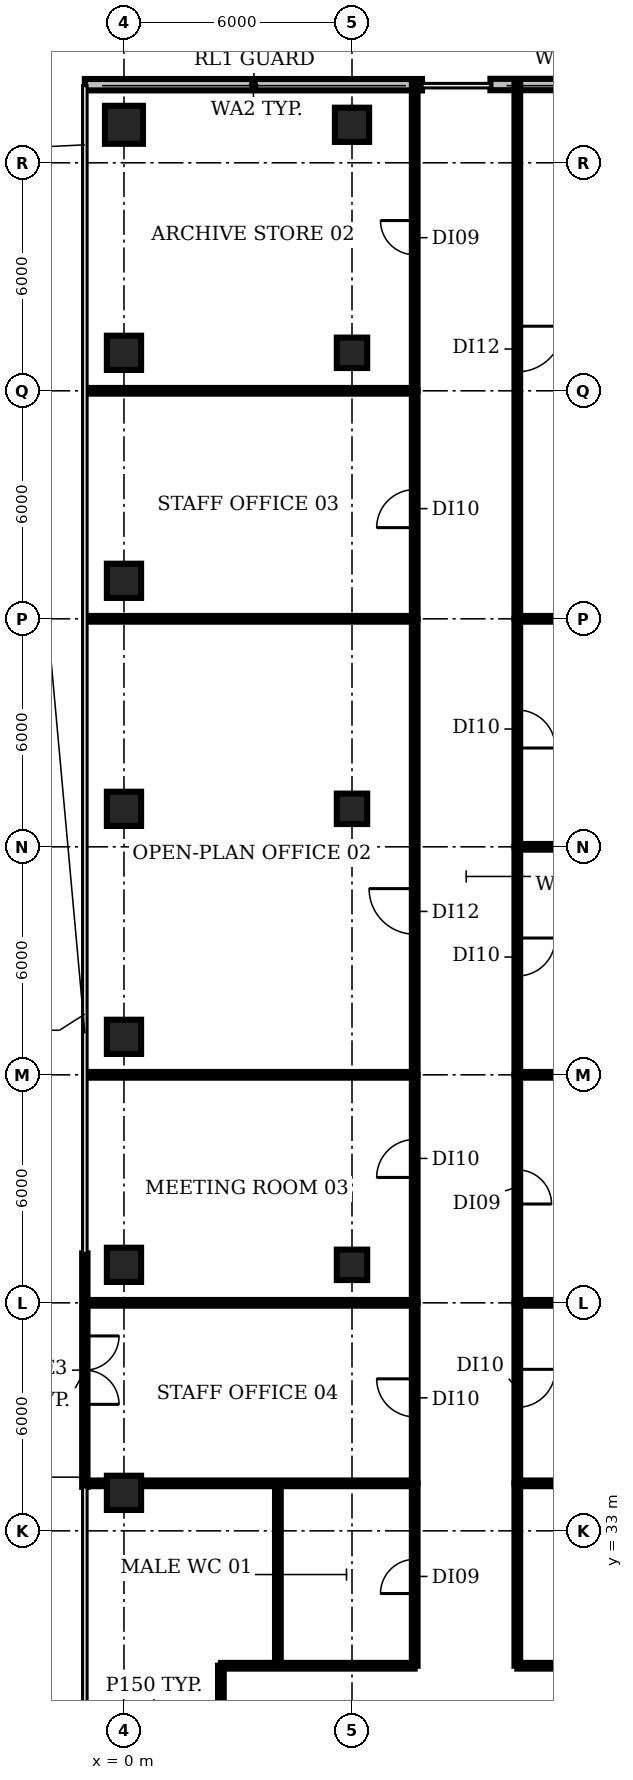
"""IFC4 building model, lengths in metres.
Left out: names, types, materials, properties, quantities, classifications, styles, units other than length and angle.
Written with IfcOpenShell. Run it as: python <this file> out.ifc"""

import sys

from ifc_helpers import new_model, si_unit, direction, frame, frame_2d, origin, origin_2d, place, context, subcontext, project, spatial, rectangle, circle, extrude, element, fill, save


model = new_model("IFC4")
c1 = context("Model", 3, precision=1e-05, world=origin(), true_north=direction((0.0, 1.0)))
c2 = subcontext(c1, "Body", "Model", "MODEL_VIEW")
j1 = project(units=[si_unit("LENGTHUNIT", "METRE"), si_unit("PLANEANGLEUNIT", "RADIAN")], contexts=[c1])
p1 = place(None, origin())
s1 = spatial("IfcSite", under=j1, at=p1, CompositionType="ELEMENT")
p2 = place(p1, origin())
s2 = spatial("IfcBuilding", under=s1, at=p2, CompositionType="ELEMENT")
p3 = place(p2, frame((0.0, 0.0, 96.2)))
s3 = spatial("IfcBuildingStorey", under=s2, at=p3, CompositionType="ELEMENT", Elevation=96.2)
for number, where, z_axis, x_axis in (
    (1, (0.0, 34.0, 0.0), (0.0, 0.0, 1.0), (1.0, 0.0, 0.0)),
    (2, (0.0, 40.0, 0.0), (0.0, 0.0, 1.0), (1.0, 0.0, 0.0)),
    (3, (0.0, 46.0, 0.0), (0.0, 0.0, 1.0), (1.0, 0.0, 0.0)),
    (4, (0.0, 52.0, 0.0), (0.0, 0.0, 1.0), (1.0, 0.0, 0.0)),
    (5, (0.0, 58.0, 0.0), (0.0, 0.0, 1.0), (1.0, 0.0, 0.0)),
    (6, (0.0, 64.0, 0.0), (0.0, 0.0, 1.0), (1.0, 0.0, 0.0)),
):
    element("IfcColumn", number, at=place(p3, frame(where, z_axis=z_axis, x_axis=x_axis)), inside=s3, PredefinedType="COLUMN", context=c2, shape_type="SweptSolid", body=[
        extrude(rectangle(XDim=0.9, YDim=0.9, at=origin_2d()), origin(), (0.0, 0.0, 1.0), 3.85),
    ])
p4 = place(p3, frame((0.0, 70.0, 0.0), z_axis=(0.0, 0.0, 1.0), x_axis=(1.0, 0.0, 0.0)))
e7 = element("IfcColumn", 7, at=p4, inside=s3, PredefinedType="COLUMN", context=c2, shape_type="SweptSolid", body=[
    extrude(circle(Radius=0.5, at=origin_2d()), origin(), (0.0, 0.0, 1.0), 3.85),
])
for number, where, z_axis, x_axis in (
    (8, (6.0, 40.0, 0.0), (0.0, 0.0, 1.0), (1.0, 0.0, 0.0)),
    (9, (6.0, 52.0, 0.0), (0.0, 0.0, 1.0), (1.0, 0.0, 0.0)),
    (10, (6.0, 64.0, 0.0), (0.0, 0.0, 1.0), (1.0, 0.0, 0.0)),
):
    element("IfcColumn", number, at=place(p3, frame(where, z_axis=z_axis, x_axis=x_axis)), inside=s3, PredefinedType="COLUMN", context=c2, shape_type="SweptSolid", body=[
        extrude(rectangle(XDim=0.8, YDim=0.8, at=origin_2d()), origin(), (0.0, 0.0, 1.0), 3.85),
    ])
p5 = place(p3, frame((6.0, 70.0, 0.0), z_axis=(0.0, 0.0, 1.0), x_axis=(1.0, 0.0, 0.0)))
e11 = element("IfcColumn", 11, at=p5, inside=s3, PredefinedType="COLUMN", context=c2, shape_type="SweptSolid", body=[
    extrude(rectangle(XDim=0.9, YDim=0.9, at=origin_2d()), origin(), (0.0, 0.0, 1.0), 3.85),
])
p6 = place(p3, frame((14.357, 71.06, 0.0), z_axis=(0.0, 0.0, 1.0), x_axis=(-1.0, 0.0, 0.0)))
e12 = element("IfcWall", 12, at=p6, inside=s3, PredefinedType="SOLIDWALL", context=c2, shape_type="SweptSolid", body=[
    extrude(rectangle(XDim=4.715, YDim=0.3, at=frame_2d((2.357, 0.0))), origin(), (0.0, 0.0, 1.0), 3.85),
])
p7 = place(p3, frame((7.843, 71.055, 0.0), z_axis=(0.0, 0.0, 1.0), x_axis=(-1.0, 0.0, 0.0)))
e13 = element("IfcWall", 13, at=p7, inside=s3, PredefinedType="SOLIDWALL", context=c2, shape_type="SweptSolid", body=[
    extrude(rectangle(XDim=8.873, YDim=0.3, at=frame_2d((4.436, 0.0))), origin(), (0.0, 0.0, 1.0), 3.85),
])
p8 = place(p3, frame((-1.03, 40.302, 0.0), z_axis=(0.0, 0.0, 1.0), x_axis=(0.0, -1.0, 0.0)))
e14 = element("IfcWall", 14, at=p8, inside=s3, PredefinedType="SOLIDWALL", context=c2, shape_type="SweptSolid", body=[
    extrude(rectangle(XDim=6.146, YDim=0.14, at=frame_2d((3.073, 0.0))), origin(), (0.0, 0.0, 1.0), 3.85),
])
p9 = place(p8, frame((2.173, 0.0, 0.0)))
e15 = element("IfcOpeningElement", 15, at=p9, cuts=e14, PredefinedType="OPENING", context=c2, shape_type="SweptSolid", body=[
    extrude(rectangle(XDim=1.8, YDim=2.4, at=frame_2d((0.9, 1.2))), frame((0.0, 0.08, 0.0), z_axis=(0.0, -1.0, 0.0), x_axis=(1.0, 0.0, 0.0)), (0.0, 0.0, 1.0), 0.16),
])
p10 = place(p3, frame((-0.965, 34.25, 0.0), z_axis=(0.0, 0.0, 1.0), x_axis=(1.0, 0.0, 0.0)))
e16 = element("IfcWall", 16, at=p10, inside=s3, PredefinedType="PARTITIONING", context=c2, shape_type="SweptSolid", body=[
    extrude(rectangle(XDim=8.615, YDim=0.15, at=frame_2d((4.308, 0.0))), origin(), (0.0, 0.0, 1.0), 2.83),
])
for number, where, z_axis, x_axis in (
    (17, (-0.98, 39.0, 0.0), (0.0, 0.0, 1.0), (1.0, 0.0, 0.0)),
    (18, (-0.98, 45.0, 0.0), (0.0, 0.0, 1.0), (1.0, 0.0, 0.0)),
    (19, (-0.98, 57.0, 0.0), (0.0, 0.0, 1.0), (1.0, 0.0, 0.0)),
    (20, (-0.98, 63.0, 0.0), (0.0, 0.0, 1.0), (1.0, 0.0, 0.0)),
):
    element("IfcWall", number, at=place(p3, frame(where, z_axis=z_axis, x_axis=x_axis)), inside=s3, PredefinedType="PARTITIONING", context=c2, shape_type="SweptSolid", body=[
        extrude(rectangle(XDim=8.63, YDim=0.15, at=frame_2d((4.315, 0.0))), origin(), (0.0, 0.0, 1.0), 2.83),
    ])
p11 = place(p3, frame((2.55, 25.55, 0.0), z_axis=(0.0, 0.0, 1.0), x_axis=(0.0, 1.0, 0.0)))
e21 = element("IfcWall", 21, at=p11, inside=s3, PredefinedType="PARTITIONING", context=c2, shape_type="SweptSolid", body=[
    extrude(rectangle(XDim=3.9, YDim=0.15, at=frame_2d((1.95, 0.0))), origin(), (0.0, 0.0, 1.0), 2.83),
])
p12 = place(p3, frame((2.55, 29.45, 0.0), z_axis=(0.0, 0.0, 1.0), x_axis=(1.0, 0.0, 0.0)))
e22 = element("IfcWall", 22, at=p12, inside=s3, PredefinedType="PARTITIONING", context=c2, shape_type="SweptSolid", body=[
    extrude(rectangle(XDim=5.1, YDim=0.15, at=frame_2d((2.55, 0.0))), origin(), (0.0, 0.0, 1.0), 2.83),
])
p13 = place(p3, frame((4.05, 29.45, 0.0), z_axis=(0.0, 0.0, 1.0), x_axis=(0.0, 1.0, 0.0)))
e23 = element("IfcWall", 23, at=p13, inside=s3, PredefinedType="PARTITIONING", context=c2, shape_type="SweptSolid", body=[
    extrude(rectangle(XDim=4.8, YDim=0.15, at=frame_2d((2.4, 0.0))), origin(), (0.0, 0.0, 1.0), 2.83),
])
p14 = place(p3, frame((7.65, 29.45, 0.0), z_axis=(0.0, 0.0, 1.0), x_axis=(0.0, 1.0, 0.0)))
e24 = element("IfcWall", 24, at=p14, inside=s3, PredefinedType="PARTITIONING", context=c2, shape_type="SweptSolid", body=[
    extrude(rectangle(XDim=4.8, YDim=0.15, at=frame_2d((2.4, 0.0))), origin(), (0.0, 0.0, 1.0), 2.83),
])
p15 = place(p14, frame((1.9, 0.0, 0.0)))
e25 = element("IfcOpeningElement", 25, at=p15, cuts=e24, PredefinedType="OPENING", context=c2, shape_type="SweptSolid", body=[
    extrude(rectangle(XDim=0.9, YDim=2.1, at=frame_2d((0.45, 1.05))), frame((0.0, 0.085, 0.0), z_axis=(0.0, -1.0, 0.0), x_axis=(1.0, 0.0, 0.0)), (0.0, 0.0, 1.0), 0.17),
])
p16 = place(p3, frame((7.65, 34.25, 0.0), z_axis=(0.0, 0.0, 1.0), x_axis=(0.0, 1.0, 0.0)))
e26 = element("IfcWall", 26, at=p16, inside=s3, PredefinedType="PARTITIONING", context=c2, shape_type="SweptSolid", body=[
    extrude(rectangle(XDim=4.75, YDim=0.15, at=frame_2d((2.375, 0.0))), origin(), (0.0, 0.0, 1.0), 2.83),
])
p17 = place(p16, frame((1.75, 0.0, 0.0)))
e27 = element("IfcOpeningElement", 27, at=p17, cuts=e26, PredefinedType="OPENING", context=c2, shape_type="SweptSolid", body=[
    extrude(rectangle(XDim=1.0, YDim=2.1, at=frame_2d((0.5, 1.05))), frame((0.0, 0.085, 0.0), z_axis=(0.0, -1.0, 0.0), x_axis=(1.0, 0.0, 0.0)), (0.0, 0.0, 1.0), 0.17),
])
p18 = place(p3, frame((7.65, 39.0, 0.0), z_axis=(0.0, 0.0, 1.0), x_axis=(0.0, 1.0, 0.0)))
e28 = element("IfcWall", 28, at=p18, inside=s3, PredefinedType="PARTITIONING", context=c2, shape_type="SweptSolid", body=[
    extrude(rectangle(XDim=6.0, YDim=0.15, at=frame_2d((3.0, 0.0))), origin(), (0.0, 0.0, 1.0), 2.83),
])
p19 = place(p18, frame((3.3, 0.0, 0.0)))
e29 = element("IfcOpeningElement", 29, at=p19, cuts=e28, PredefinedType="OPENING", context=c2, shape_type="SweptSolid", body=[
    extrude(rectangle(XDim=1.0, YDim=2.1, at=frame_2d((0.5, 1.05))), frame((0.0, 0.085, 0.0), z_axis=(0.0, -1.0, 0.0), x_axis=(1.0, 0.0, 0.0)), (0.0, 0.0, 1.0), 0.17),
])
p20 = place(p3, frame((7.65, 45.0, 0.0), z_axis=(0.0, 0.0, 1.0), x_axis=(0.0, 1.0, 0.0)))
e30 = element("IfcWall", 30, at=p20, inside=s3, PredefinedType="PARTITIONING", context=c2, shape_type="SweptSolid", body=[
    extrude(rectangle(XDim=12.0, YDim=0.15, at=frame_2d((6.0, 0.0))), origin(), (0.0, 0.0, 1.0), 2.83),
])
p21 = place(p20, frame((3.7, 0.0, 0.0)))
e31 = element("IfcOpeningElement", 31, at=p21, cuts=e30, PredefinedType="OPENING", context=c2, shape_type="SweptSolid", body=[
    extrude(rectangle(XDim=1.2, YDim=2.1, at=frame_2d((0.6, 1.05))), frame((0.0, 0.085, 0.0), z_axis=(0.0, -1.0, 0.0), x_axis=(1.0, 0.0, 0.0)), (0.0, 0.0, 1.0), 0.17),
])
p22 = place(p3, frame((7.65, 57.0, 0.0), z_axis=(0.0, 0.0, 1.0), x_axis=(0.0, 1.0, 0.0)))
e32 = element("IfcWall", 32, at=p22, inside=s3, PredefinedType="PARTITIONING", context=c2, shape_type="SweptSolid", body=[
    extrude(rectangle(XDim=6.0, YDim=0.15, at=frame_2d((3.0, 0.0))), origin(), (0.0, 0.0, 1.0), 2.83),
])
p23 = place(p22, frame((2.4, 0.0, 0.0)))
e33 = element("IfcOpeningElement", 33, at=p23, cuts=e32, PredefinedType="OPENING", context=c2, shape_type="SweptSolid", body=[
    extrude(rectangle(XDim=1.0, YDim=2.1, at=frame_2d((0.5, 1.05))), frame((0.0, 0.085, 0.0), z_axis=(0.0, -1.0, 0.0), x_axis=(1.0, 0.0, 0.0)), (0.0, 0.0, 1.0), 0.17),
])
p24 = place(p3, frame((7.65, 63.0, 0.0), z_axis=(0.0, 0.0, 1.0), x_axis=(0.0, 1.0, 0.0)))
e34 = element("IfcWall", 34, at=p24, inside=s3, PredefinedType="PARTITIONING", context=c2, shape_type="SweptSolid", body=[
    extrude(rectangle(XDim=8.09, YDim=0.15, at=frame_2d((4.045, 0.0))), origin(), (0.0, 0.0, 1.0), 2.83),
])
p25 = place(p24, frame((3.58, 0.0, 0.0)))
e35 = element("IfcOpeningElement", 35, at=p25, cuts=e34, PredefinedType="OPENING", context=c2, shape_type="SweptSolid", body=[
    extrude(rectangle(XDim=0.9, YDim=2.1, at=frame_2d((0.45, 1.05))), frame((0.0, 0.085, 0.0), z_axis=(0.0, -1.0, 0.0), x_axis=(1.0, 0.0, 0.0)), (0.0, 0.0, 1.0), 0.17),
])
p26 = place(p3, frame((10.35, 29.45, 0.0), z_axis=(0.0, 0.0, 1.0), x_axis=(0.0, 1.0, 0.0)))
e36 = element("IfcWall", 36, at=p26, inside=s3, PredefinedType="PARTITIONING", context=c2, shape_type="SweptSolid", body=[
    extrude(rectangle(XDim=4.8, YDim=0.15, at=frame_2d((2.4, 0.0))), origin(), (0.0, 0.0, 1.0), 2.83),
])
p27 = place(p3, frame((10.35, 29.45, 0.0), z_axis=(0.0, 0.0, 1.0), x_axis=(1.0, 0.0, 0.0)))
e37 = element("IfcWall", 37, at=p27, inside=s3, PredefinedType="PARTITIONING", context=c2, shape_type="SweptSolid", body=[
    extrude(rectangle(XDim=4.05, YDim=0.15, at=frame_2d((2.025, 0.0))), origin(), (0.0, 0.0, 1.0), 2.83),
])
p28 = place(p3, frame((10.35, 34.25, 0.0), z_axis=(0.0, 0.0, 1.0), x_axis=(1.0, 0.0, 0.0)))
e38 = element("IfcWall", 38, at=p28, inside=s3, PredefinedType="PARTITIONING", context=c2, shape_type="SweptSolid", body=[
    extrude(rectangle(XDim=14.88, YDim=0.15, at=frame_2d((7.44, 0.0))), origin(), (0.0, 0.0, 1.0), 2.83),
])
p29 = place(p3, frame((10.35, 39.0, 0.0), z_axis=(0.0, 0.0, 1.0), x_axis=(0.0, -1.0, 0.0)))
e39 = element("IfcWall", 39, at=p29, inside=s3, PredefinedType="PARTITIONING", context=c2, shape_type="SweptSolid", body=[
    extrude(rectangle(XDim=4.75, YDim=0.15, at=frame_2d((2.375, 0.0))), origin(), (0.0, 0.0, 1.0), 2.83),
])
p30 = place(p29, frame((1.75, 0.0, 0.0)))
e40 = element("IfcOpeningElement", 40, at=p30, cuts=e39, PredefinedType="OPENING", context=c2, shape_type="SweptSolid", body=[
    extrude(rectangle(XDim=1.0, YDim=2.1, at=frame_2d((0.5, 1.05))), frame((0.0, 0.085, 0.0), z_axis=(0.0, -1.0, 0.0), x_axis=(1.0, 0.0, 0.0)), (0.0, 0.0, 1.0), 0.17),
])
p31 = place(p3, frame((10.35, 39.0, 0.0), z_axis=(0.0, 0.0, 1.0), x_axis=(1.0, 0.0, 0.0)))
e41 = element("IfcWall", 41, at=p31, inside=s3, PredefinedType="PARTITIONING", context=c2, shape_type="SweptSolid", body=[
    extrude(rectangle(XDim=14.63, YDim=0.15, at=frame_2d((7.315, 0.0))), origin(), (0.0, 0.0, 1.0), 2.83),
])
p32 = place(p3, frame((10.35, 45.0, 0.0), z_axis=(0.0, 0.0, 1.0), x_axis=(0.0, -1.0, 0.0)))
e42 = element("IfcWall", 42, at=p32, inside=s3, PredefinedType="PARTITIONING", context=c2, shape_type="SweptSolid", body=[
    extrude(rectangle(XDim=6.0, YDim=0.15, at=frame_2d((3.0, 0.0))), origin(), (0.0, 0.0, 1.0), 2.83),
])
p33 = place(p32, frame((2.5, 0.0, 0.0)))
e43 = element("IfcOpeningElement", 43, at=p33, cuts=e42, PredefinedType="OPENING", context=c2, shape_type="SweptSolid", body=[
    extrude(rectangle(XDim=0.9, YDim=2.1, at=frame_2d((0.45, 1.05))), frame((0.0, 0.085, 0.0), z_axis=(0.0, -1.0, 0.0), x_axis=(1.0, 0.0, 0.0)), (0.0, 0.0, 1.0), 0.17),
])
p34 = place(p3, frame((10.35, 45.0, 0.0), z_axis=(0.0, 0.0, 1.0), x_axis=(1.0, 0.0, 0.0)))
e44 = element("IfcWall", 44, at=p34, inside=s3, PredefinedType="PARTITIONING", context=c2, shape_type="SweptSolid", body=[
    extrude(rectangle(XDim=14.63, YDim=0.15, at=frame_2d((7.315, 0.0))), origin(), (0.0, 0.0, 1.0), 2.83),
])
p35 = place(p3, frame((10.35, 51.0, 0.0), z_axis=(0.0, 0.0, 1.0), x_axis=(0.0, -1.0, 0.0)))
e45 = element("IfcWall", 45, at=p35, inside=s3, PredefinedType="PARTITIONING", context=c2, shape_type="SweptSolid", body=[
    extrude(rectangle(XDim=6.0, YDim=0.15, at=frame_2d((3.0, 0.0))), origin(), (0.0, 0.0, 1.0), 2.83),
])
p36 = place(p35, frame((2.4, 0.0, 0.0)))
e46 = element("IfcOpeningElement", 46, at=p36, cuts=e45, PredefinedType="OPENING", context=c2, shape_type="SweptSolid", body=[
    extrude(rectangle(XDim=1.0, YDim=2.1, at=frame_2d((0.5, 1.05))), frame((0.0, 0.085, 0.0), z_axis=(0.0, -1.0, 0.0), x_axis=(1.0, 0.0, 0.0)), (0.0, 0.0, 1.0), 0.17),
])
p37 = place(p3, frame((10.35, 51.0, 0.0), z_axis=(0.0, 0.0, 1.0), x_axis=(1.0, 0.0, 0.0)))
e47 = element("IfcWall", 47, at=p37, inside=s3, PredefinedType="PARTITIONING", context=c2, shape_type="SweptSolid", body=[
    extrude(rectangle(XDim=14.63, YDim=0.15, at=frame_2d((7.315, 0.0))), origin(), (0.0, 0.0, 1.0), 2.83),
])
p38 = place(p3, frame((10.35, 57.0, 0.0), z_axis=(0.0, 0.0, 1.0), x_axis=(0.0, -1.0, 0.0)))
e48 = element("IfcWall", 48, at=p38, inside=s3, PredefinedType="PARTITIONING", context=c2, shape_type="SweptSolid", body=[
    extrude(rectangle(XDim=6.0, YDim=0.15, at=frame_2d((3.0, 0.0))), origin(), (0.0, 0.0, 1.0), 2.83),
])
p39 = place(p38, frame((2.4, 0.0, 0.0)))
e49 = element("IfcOpeningElement", 49, at=p39, cuts=e48, PredefinedType="OPENING", context=c2, shape_type="SweptSolid", body=[
    extrude(rectangle(XDim=1.0, YDim=2.1, at=frame_2d((0.5, 1.05))), frame((0.0, 0.085, 0.0), z_axis=(0.0, -1.0, 0.0), x_axis=(1.0, 0.0, 0.0)), (0.0, 0.0, 1.0), 0.17),
])
p40 = place(p3, frame((10.35, 57.0, 0.0), z_axis=(0.0, 0.0, 1.0), x_axis=(1.0, 0.0, 0.0)))
e50 = element("IfcWall", 50, at=p40, inside=s3, PredefinedType="PARTITIONING", context=c2, shape_type="SweptSolid", body=[
    extrude(rectangle(XDim=14.63, YDim=0.15, at=frame_2d((7.315, 0.0))), origin(), (0.0, 0.0, 1.0), 2.83),
])
p41 = place(p3, frame((10.35, 71.09, 0.0), z_axis=(0.0, 0.0, 1.0), x_axis=(0.0, -1.0, 0.0)))
e51 = element("IfcWall", 51, at=p41, inside=s3, PredefinedType="PARTITIONING", context=c2, shape_type="SweptSolid", body=[
    extrude(rectangle(XDim=14.09, YDim=0.15, at=frame_2d((7.045, 0.0))), origin(), (0.0, 0.0, 1.0), 2.83),
])
p42 = place(p41, frame((6.39, 0.0, 0.0)))
e52 = element("IfcOpeningElement", 52, at=p42, cuts=e51, PredefinedType="OPENING", context=c2, shape_type="SweptSolid", body=[
    extrude(rectangle(XDim=1.2, YDim=2.1, at=frame_2d((0.6, 1.05))), frame((0.0, 0.085, 0.0), z_axis=(0.0, -1.0, 0.0), x_axis=(1.0, 0.0, 0.0)), (0.0, 0.0, 1.0), 0.17),
])
p43 = place(p9, origin())
e53 = element("IfcDoor", 53, at=p43, inside=s3, OperationType="DOUBLE_DOOR_DOUBLE_SWING", PredefinedType="DOOR", context=c2, shape_type="SweptSolid", body=[
    extrude(rectangle(XDim=1.8, YDim=2.4, at=frame_2d((0.9, 1.2))), frame((0.0, 0.025, 0.0), z_axis=(0.0, -1.0, 0.0), x_axis=(1.0, 0.0, 0.0)), (0.0, 0.0, 1.0), 0.05),
])
fill(e15, e53)
p44 = place(p15, origin())
e54 = element("IfcDoor", 54, at=p44, inside=s3, OperationType="SINGLE_SWING_LEFT", PredefinedType="DOOR", context=c2, shape_type="SweptSolid", body=[
    extrude(rectangle(XDim=0.9, YDim=2.1, at=frame_2d((0.45, 1.05))), frame((0.0, 0.025, 0.0), z_axis=(0.0, -1.0, 0.0), x_axis=(1.0, 0.0, 0.0)), (0.0, 0.0, 1.0), 0.05),
])
fill(e25, e54)
p45 = place(p17, origin())
e55 = element("IfcDoor", 55, at=p45, inside=s3, OperationType="SINGLE_SWING_RIGHT", PredefinedType="DOOR", context=c2, shape_type="SweptSolid", body=[
    extrude(rectangle(XDim=1.0, YDim=2.1, at=frame_2d((0.5, 1.05))), frame((0.0, 0.025, 0.0), z_axis=(0.0, -1.0, 0.0), x_axis=(1.0, 0.0, 0.0)), (0.0, 0.0, 1.0), 0.05),
])
fill(e27, e55)
p46 = place(p19, origin())
e56 = element("IfcDoor", 56, at=p46, inside=s3, OperationType="SINGLE_SWING_LEFT", PredefinedType="DOOR", context=c2, shape_type="SweptSolid", body=[
    extrude(rectangle(XDim=1.0, YDim=2.1, at=frame_2d((0.5, 1.05))), frame((0.0, 0.025, 0.0), z_axis=(0.0, -1.0, 0.0), x_axis=(1.0, 0.0, 0.0)), (0.0, 0.0, 1.0), 0.05),
])
fill(e29, e56)
p47 = place(p21, origin())
e57 = element("IfcDoor", 57, at=p47, inside=s3, OperationType="SINGLE_SWING_RIGHT", PredefinedType="DOOR", context=c2, shape_type="SweptSolid", body=[
    extrude(rectangle(XDim=1.2, YDim=2.1, at=frame_2d((0.6, 1.05))), frame((0.0, 0.025, 0.0), z_axis=(0.0, -1.0, 0.0), x_axis=(1.0, 0.0, 0.0)), (0.0, 0.0, 1.0), 0.05),
])
fill(e31, e57)
p48 = place(p23, origin())
e58 = element("IfcDoor", 58, at=p48, inside=s3, OperationType="SINGLE_SWING_LEFT", PredefinedType="DOOR", context=c2, shape_type="SweptSolid", body=[
    extrude(rectangle(XDim=1.0, YDim=2.1, at=frame_2d((0.5, 1.05))), frame((0.0, 0.025, 0.0), z_axis=(0.0, -1.0, 0.0), x_axis=(1.0, 0.0, 0.0)), (0.0, 0.0, 1.0), 0.05),
])
fill(e33, e58)
p49 = place(p25, origin())
e59 = element("IfcDoor", 59, at=p49, inside=s3, OperationType="SINGLE_SWING_RIGHT", PredefinedType="DOOR", context=c2, shape_type="SweptSolid", body=[
    extrude(rectangle(XDim=0.9, YDim=2.1, at=frame_2d((0.45, 1.05))), frame((0.0, 0.025, 0.0), z_axis=(0.0, -1.0, 0.0), x_axis=(1.0, 0.0, 0.0)), (0.0, 0.0, 1.0), 0.05),
])
fill(e35, e59)
p50 = place(p30, origin())
e60 = element("IfcDoor", 60, at=p50, inside=s3, OperationType="SINGLE_SWING_LEFT", PredefinedType="DOOR", context=c2, shape_type="SweptSolid", body=[
    extrude(rectangle(XDim=1.0, YDim=2.1, at=frame_2d((0.5, 1.05))), frame((0.0, 0.025, 0.0), z_axis=(0.0, -1.0, 0.0), x_axis=(1.0, 0.0, 0.0)), (0.0, 0.0, 1.0), 0.05),
])
fill(e40, e60)
p51 = place(p33, origin())
e61 = element("IfcDoor", 61, at=p51, inside=s3, OperationType="SINGLE_SWING_RIGHT", PredefinedType="DOOR", context=c2, shape_type="SweptSolid", body=[
    extrude(rectangle(XDim=0.9, YDim=2.1, at=frame_2d((0.45, 1.05))), frame((0.0, 0.025, 0.0), z_axis=(0.0, -1.0, 0.0), x_axis=(1.0, 0.0, 0.0)), (0.0, 0.0, 1.0), 0.05),
])
fill(e43, e61)
p52 = place(p36, origin())
e62 = element("IfcDoor", 62, at=p52, inside=s3, OperationType="SINGLE_SWING_LEFT", PredefinedType="DOOR", context=c2, shape_type="SweptSolid", body=[
    extrude(rectangle(XDim=1.0, YDim=2.1, at=frame_2d((0.5, 1.05))), frame((0.0, 0.025, 0.0), z_axis=(0.0, -1.0, 0.0), x_axis=(1.0, 0.0, 0.0)), (0.0, 0.0, 1.0), 0.05),
])
fill(e46, e62)
p53 = place(p39, origin())
e63 = element("IfcDoor", 63, at=p53, inside=s3, OperationType="SINGLE_SWING_RIGHT", PredefinedType="DOOR", context=c2, shape_type="SweptSolid", body=[
    extrude(rectangle(XDim=1.0, YDim=2.1, at=frame_2d((0.5, 1.05))), frame((0.0, 0.025, 0.0), z_axis=(0.0, -1.0, 0.0), x_axis=(1.0, 0.0, 0.0)), (0.0, 0.0, 1.0), 0.05),
])
fill(e49, e63)
p54 = place(p42, origin())
e64 = element("IfcDoor", 64, at=p54, inside=s3, OperationType="SINGLE_SWING_LEFT", PredefinedType="DOOR", context=c2, shape_type="SweptSolid", body=[
    extrude(rectangle(XDim=1.2, YDim=2.1, at=frame_2d((0.6, 1.05))), frame((0.0, 0.025, 0.0), z_axis=(0.0, -1.0, 0.0), x_axis=(1.0, 0.0, 0.0)), (0.0, 0.0, 1.0), 0.05),
])
fill(e52, e64)
save(model, sys.argv[1])
